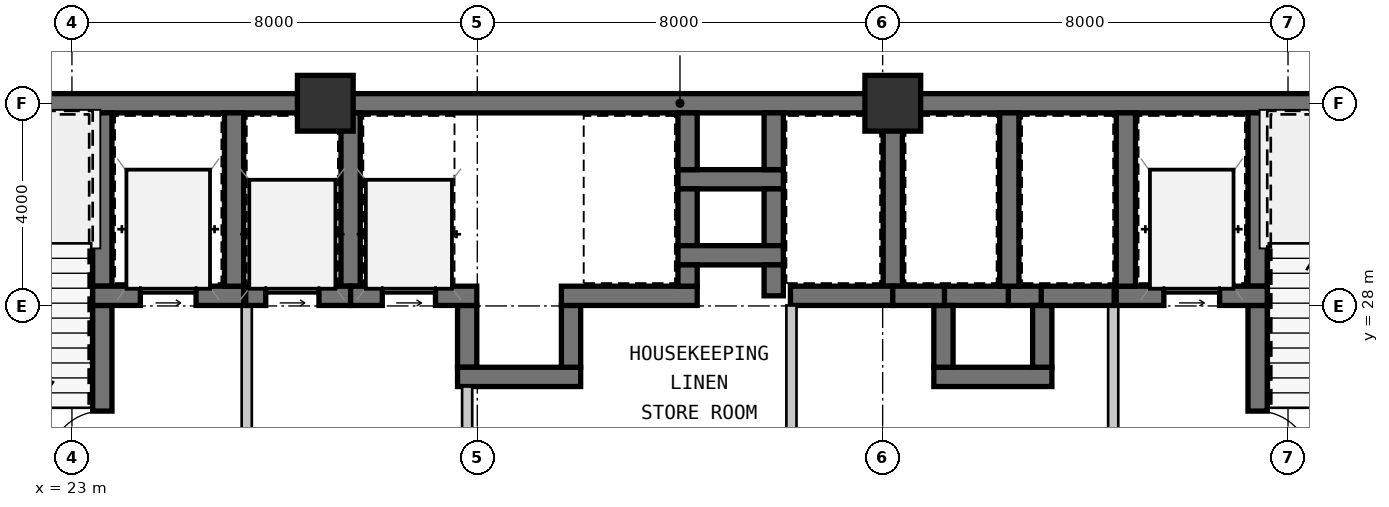
"""IFC4 building model, lengths in metres.
Left out: names, types, materials, properties, quantities, classifications, styles, units other than length and angle.
Written with IfcOpenShell. Run it as: python <this file> out.ifc"""

import sys

from ifc_helpers import new_model, si_unit, direction, frame, frame_2d, origin, origin_2d, place, context, subcontext, project, spatial, rectangle, extrude, source, transform, mapped, element, fill, save


model = new_model("IFC4")
c1 = context("Model", 3, precision=1e-05, world=origin(), true_north=direction((0.0, 1.0)))
c2 = subcontext(c1, "Body", "Model", "MODEL_VIEW")
j1 = project(units=[si_unit("LENGTHUNIT", "METRE"), si_unit("PLANEANGLEUNIT", "RADIAN")], contexts=[c1])
p1 = place(None, origin())
s1 = spatial("IfcSite", under=j1, at=p1, CompositionType="ELEMENT")
p2 = place(p1, origin())
s2 = spatial("IfcBuilding", under=s1, at=p2, CompositionType="ELEMENT")
p3 = place(p2, frame((0.0, 0.0, 16.8)))
s3 = spatial("IfcBuildingStorey", under=s2, at=p3, CompositionType="ELEMENT", Elevation=16.8)
m1 = source(origin(), c2, "Body", "SweptSolid", [
    extrude(rectangle(XDim=1.1, YDim=1.1, at=origin_2d()), origin(), (0.0, 0.0, 1.0), 3.15),
])
for number, where, z_axis, x_axis in (
    (1, (28.0, 32.0, 0.0), (0.0, 0.0, 1.0), (1.0, 0.0, 0.0)),
    (2, (39.2, 32.0, 0.0), (0.0, 0.0, 1.0), (1.0, 0.0, 0.0)),
):
    element("IfcColumn", number, at=place(p3, frame(where, z_axis=z_axis, x_axis=x_axis)), inside=s3, PredefinedType="COLUMN", context=c2, shape_type="MappedRepresentation", body=[
        mapped(m1, transform((0.0, 0.0, 0.0), scale=1.0)),
    ])
m2 = source(origin(), c2, "Body", "SweptSolid", [
    extrude(rectangle(XDim=9.19, YDim=0.38, at=frame_2d((4.595, 0.0))), origin(), (0.0, 0.0, 1.0), 2.93),
])
p4 = place(p3, frame((18.81, 32.0, 0.0), z_axis=(0.0, 0.0, 1.0), x_axis=(1.0, 0.0, 0.0)))
e3 = element("IfcWall", 3, at=p4, inside=s3, PredefinedType="SHEAR", context=c2, shape_type="MappedRepresentation", body=[
    mapped(m2, transform((0.0, 0.0, 0.0), scale=1.0)),
])
m3 = source(origin(), c2, "Body", "SweptSolid", [
    extrude(rectangle(XDim=11.2, YDim=0.38, at=frame_2d((5.6, 0.0))), origin(), (0.0, 0.0, 1.0), 2.93),
])
p5 = place(p3, frame((28.0, 32.0, 0.0), z_axis=(0.0, 0.0, 1.0), x_axis=(1.0, 0.0, 0.0)))
e4 = element("IfcWall", 4, at=p5, inside=s3, PredefinedType="SHEAR", context=c2, shape_type="MappedRepresentation", body=[
    mapped(m3, transform((0.0, 0.0, 0.0), scale=1.0)),
])
m4 = source(origin(), c2, "Body", "SweptSolid", [
    extrude(rectangle(XDim=11.99, YDim=0.38, at=frame_2d((5.995, 0.0))), origin(), (0.0, 0.0, 1.0), 2.93),
])
p6 = place(p3, frame((39.2, 32.0, 0.0), z_axis=(0.0, 0.0, 1.0), x_axis=(1.0, 0.0, 0.0)))
e5 = element("IfcWall", 5, at=p6, inside=s3, PredefinedType="SHEAR", context=c2, shape_type="MappedRepresentation", body=[
    mapped(m4, transform((0.0, 0.0, 0.0), scale=1.0)),
])
m5 = source(origin(), c2, "Body", "SweptSolid", [
    extrude(rectangle(XDim=3.42, YDim=0.38, at=frame_2d((1.71, 0.0))), origin(), (0.0, 0.0, 1.0), 2.93),
])
p7 = place(p3, frame((23.6, 28.39, 0.0), z_axis=(0.0, 0.0, 1.0), x_axis=(0.0, 1.0, 0.0)))
e6 = element("IfcWall", 6, at=p7, inside=s3, PredefinedType="SHEAR", context=c2, shape_type="MappedRepresentation", body=[
    mapped(m5, transform((0.0, 0.0, 0.0), scale=1.0)),
])
m6 = source(origin(), c2, "Body", "SweptSolid", [
    extrude(rectangle(XDim=3.82, YDim=0.38, at=frame_2d((1.91, 0.0))), origin(), (0.0, 0.0, 1.0), 2.93),
])
p8 = place(p3, frame((23.6, 24.19, 0.0), z_axis=(0.0, 0.0, 1.0), x_axis=(0.0, 1.0, 0.0)))
e7 = element("IfcWall", 7, at=p8, inside=s3, PredefinedType="SHEAR", context=c2, shape_type="MappedRepresentation", body=[
    mapped(m6, transform((0.0, 0.0, 0.0), scale=1.0)),
])
m7 = source(origin(), c2, "Body", "SweptSolid", [
    extrude(rectangle(XDim=1.05, YDim=2.1, at=frame_2d((0.525, 1.05))), frame((0.0, 0.2, 0.0), z_axis=(0.0, -1.0, 0.0), x_axis=(1.0, 0.0, 0.0)), (0.0, 0.0, 1.0), 0.4),
])
p9 = place(p8, frame((0.685, 0.0, 0.0)))
e8 = element("IfcOpeningElement", 8, at=p9, cuts=e7, PredefinedType="OPENING", context=c2, shape_type="MappedRepresentation", body=[
    mapped(m7, transform((0.0, 0.0, 0.0), scale=1.0)),
])
m8 = source(origin(), c2, "Body", "SweptSolid", [
    extrude(rectangle(XDim=2.98, YDim=0.38, at=frame_2d((1.49, 0.0))), origin(), (0.0, 0.0, 1.0), 2.93),
])
p10 = place(p3, frame((23.41, 28.2, 0.0), z_axis=(0.0, 0.0, 1.0), x_axis=(1.0, 0.0, 0.0)))
e9 = element("IfcWall", 9, at=p10, inside=s3, PredefinedType="SHEAR", context=c2, shape_type="MappedRepresentation", body=[
    mapped(m8, transform((0.0, 0.0, 0.0), scale=1.0)),
])
m9 = source(origin(), c2, "Body", "SweptSolid", [
    extrude(rectangle(XDim=1.1, YDim=2.15, at=frame_2d((0.55, 1.075))), frame((0.0, 0.2, 0.0), z_axis=(0.0, -1.0, 0.0), x_axis=(1.0, 0.0, 0.0)), (0.0, 0.0, 1.0), 0.4),
])
p11 = place(p10, frame((0.94, 0.0, 0.0)))
e10 = element("IfcOpeningElement", 10, at=p11, cuts=e9, PredefinedType="OPENING", context=c2, shape_type="MappedRepresentation", body=[
    mapped(m9, transform((0.0, 0.0, 0.0), scale=1.0)),
])
p12 = place(p3, frame((26.2, 28.39, 0.0), z_axis=(0.0, 0.0, 1.0), x_axis=(0.0, 1.0, 0.0)))
e11 = element("IfcWall", 11, at=p12, inside=s3, PredefinedType="SHEAR", context=c2, shape_type="MappedRepresentation", body=[
    mapped(m5, transform((0.0, 0.0, 0.0), scale=1.0)),
])
m10 = source(origin(), c2, "Body", "SweptSolid", [
    extrude(rectangle(XDim=3.91, YDim=0.2, at=frame_2d((1.955, 0.0))), origin(), (0.0, 0.0, 1.0), 2.93),
])
p13 = place(p3, frame((26.45, 24.1, 0.0), z_axis=(0.0, 0.0, 1.0), x_axis=(0.0, 1.0, 0.0)))
e12 = element("IfcWall", 12, at=p13, inside=s3, PredefinedType="SOLIDWALL", context=c2, shape_type="MappedRepresentation", body=[
    mapped(m10, transform((0.0, 0.0, 0.0), scale=1.0)),
])
p14 = place(p3, frame((46.4, 31.81, 0.0), z_axis=(0.0, 0.0, 1.0), x_axis=(0.0, -1.0, 0.0)))
e13 = element("IfcWall", 13, at=p14, inside=s3, PredefinedType="SHEAR", context=c2, shape_type="MappedRepresentation", body=[
    mapped(m5, transform((0.0, 0.0, 0.0), scale=1.0)),
])
p15 = place(p3, frame((46.4, 28.01, 0.0), z_axis=(0.0, 0.0, 1.0), x_axis=(0.0, -1.0, 0.0)))
e14 = element("IfcWall", 14, at=p15, inside=s3, PredefinedType="SHEAR", context=c2, shape_type="MappedRepresentation", body=[
    mapped(m6, transform((0.0, 0.0, 0.0), scale=1.0)),
])
p16 = place(p15, frame((2.085, 0.0, 0.0)))
e15 = element("IfcOpeningElement", 15, at=p16, cuts=e14, PredefinedType="OPENING", context=c2, shape_type="MappedRepresentation", body=[
    mapped(m7, transform((0.0, 0.0, 0.0), scale=1.0)),
])
p17 = place(p3, frame((43.61, 28.2, 0.0), z_axis=(0.0, 0.0, 1.0), x_axis=(1.0, 0.0, 0.0)))
e16 = element("IfcWall", 16, at=p17, inside=s3, PredefinedType="SHEAR", context=c2, shape_type="MappedRepresentation", body=[
    mapped(m8, transform((0.0, 0.0, 0.0), scale=1.0)),
])
p18 = place(p17, frame((0.94, 0.0, 0.0)))
e17 = element("IfcOpeningElement", 17, at=p18, cuts=e16, PredefinedType="OPENING", context=c2, shape_type="MappedRepresentation", body=[
    mapped(m9, transform((0.0, 0.0, 0.0), scale=1.0)),
])
p19 = place(p3, frame((43.8, 31.81, 0.0), z_axis=(0.0, 0.0, 1.0), x_axis=(0.0, -1.0, 0.0)))
e18 = element("IfcWall", 18, at=p19, inside=s3, PredefinedType="SHEAR", context=c2, shape_type="MappedRepresentation", body=[
    mapped(m5, transform((0.0, 0.0, 0.0), scale=1.0)),
])
p20 = place(p3, frame((43.55, 28.01, 0.0), z_axis=(0.0, 0.0, 1.0), x_axis=(0.0, -1.0, 0.0)))
e19 = element("IfcWall", 19, at=p20, inside=s3, PredefinedType="SOLIDWALL", context=c2, shape_type="MappedRepresentation", body=[
    mapped(m10, transform((0.0, 0.0, 0.0), scale=1.0)),
])
m11 = source(origin(), c2, "Body", "SweptSolid", [
    extrude(rectangle(XDim=2.08, YDim=0.38, at=frame_2d((1.04, 0.0))), origin(), (0.0, 0.0, 1.0), 2.93),
])
p21 = place(p3, frame((34.96, 30.5, 0.0), z_axis=(0.0, 0.0, 1.0), x_axis=(1.0, 0.0, 0.0)))
e20 = element("IfcWall", 20, at=p21, inside=s3, PredefinedType="SHEAR", context=c2, shape_type="MappedRepresentation", body=[
    mapped(m11, transform((0.0, 0.0, 0.0), scale=1.0)),
])
m12 = source(origin(), c2, "Body", "SweptSolid", [
    extrude(rectangle(XDim=1.12, YDim=0.38, at=frame_2d((0.56, 0.0))), origin(), (0.0, 0.0, 1.0), 2.93),
])
for number, where, z_axis, x_axis in (
    (21, (35.15, 31.81, 0.0), (0.0, 0.0, 1.0), (0.0, -1.0, 0.0)),
    (22, (36.85, 30.69, 0.0), (0.0, 0.0, 1.0), (0.0, 1.0, 0.0)),
    (23, (35.15, 30.31, 0.0), (0.0, 0.0, 1.0), (0.0, -1.0, 0.0)),
    (24, (36.85, 29.19, 0.0), (0.0, 0.0, 1.0), (0.0, 1.0, 0.0)),
):
    element("IfcWall", number, at=place(p3, frame(where, z_axis=z_axis, x_axis=x_axis)), inside=s3, PredefinedType="SHEAR", context=c2, shape_type="MappedRepresentation", body=[
        mapped(m12, transform((0.0, 0.0, 0.0), scale=1.0)),
    ])
p22 = place(p3, frame((34.96, 29.0, 0.0), z_axis=(0.0, 0.0, 1.0), x_axis=(1.0, 0.0, 0.0)))
e25 = element("IfcWall", 25, at=p22, inside=s3, PredefinedType="SHEAR", context=c2, shape_type="MappedRepresentation", body=[
    mapped(m11, transform((0.0, 0.0, 0.0), scale=1.0)),
])
m13 = source(origin(), c2, "Body", "SweptSolid", [
    extrude(rectangle(XDim=1.22, YDim=0.38, at=frame_2d((0.61, 0.0))), origin(), (0.0, 0.0, 1.0), 2.93),
])
p23 = place(p3, frame((30.8, 28.01, 0.0), z_axis=(0.0, 0.0, 1.0), x_axis=(0.0, -1.0, 0.0)))
e26 = element("IfcWall", 26, at=p23, inside=s3, PredefinedType="SHEAR", context=c2, shape_type="MappedRepresentation", body=[
    mapped(m13, transform((0.0, 0.0, 0.0), scale=1.0)),
])
m14 = source(origin(), c2, "Body", "SweptSolid", [
    extrude(rectangle(XDim=2.43, YDim=0.38, at=frame_2d((1.215, 0.0))), origin(), (0.0, 0.0, 1.0), 2.93),
])
p24 = place(p3, frame((30.61, 26.6, 0.0), z_axis=(0.0, 0.0, 1.0), x_axis=(1.0, 0.0, 0.0)))
e27 = element("IfcWall", 27, at=p24, inside=s3, PredefinedType="SHEAR", context=c2, shape_type="MappedRepresentation", body=[
    mapped(m14, transform((0.0, 0.0, 0.0), scale=1.0)),
])
p25 = place(p3, frame((32.85, 26.79, 0.0), z_axis=(0.0, 0.0, 1.0), x_axis=(0.0, 1.0, 0.0)))
e28 = element("IfcWall", 28, at=p25, inside=s3, PredefinedType="SHEAR", context=c2, shape_type="MappedRepresentation", body=[
    mapped(m13, transform((0.0, 0.0, 0.0), scale=1.0)),
])
m15 = source(origin(), c2, "Body", "SweptSolid", [
    extrude(rectangle(XDim=1.32, YDim=0.38, at=frame_2d((0.66, 0.0))), origin(), (0.0, 0.0, 1.0), 2.93),
])
p26 = place(p3, frame((41.52, 28.2, 0.0), z_axis=(0.0, 0.0, 1.0), x_axis=(-1.0, 0.0, 0.0)))
e29 = element("IfcWall", 29, at=p26, inside=s3, PredefinedType="SHEAR", context=c2, shape_type="MappedRepresentation", body=[
    mapped(m15, transform((0.0, 0.0, 0.0), scale=1.0)),
])
m16 = source(origin(), c2, "Body", "SweptSolid", [
    extrude(rectangle(XDim=0.67, YDim=0.38, at=frame_2d((0.335, 0.0))), origin(), (0.0, 0.0, 1.0), 2.93),
])
p27 = place(p3, frame((42.15, 28.2, 0.0), z_axis=(0.0, 0.0, 1.0), x_axis=(-1.0, 0.0, 0.0)))
e30 = element("IfcWall", 30, at=p27, inside=s3, PredefinedType="SHEAR", context=c2, shape_type="MappedRepresentation", body=[
    mapped(m16, transform((0.0, 0.0, 0.0), scale=1.0)),
])
m17 = source(origin(), c2, "Body", "SweptSolid", [
    extrude(rectangle(XDim=2.33, YDim=0.38, at=frame_2d((1.165, 0.0))), origin(), (0.0, 0.0, 1.0), 2.93),
])
p28 = place(p3, frame((40.01, 26.6, 0.0), z_axis=(0.0, 0.0, 1.0), x_axis=(1.0, 0.0, 0.0)))
e31 = element("IfcWall", 31, at=p28, inside=s3, PredefinedType="SHEAR", context=c2, shape_type="MappedRepresentation", body=[
    mapped(m17, transform((0.0, 0.0, 0.0), scale=1.0)),
])
for number, where, z_axis, x_axis in (
    (32, (40.2, 28.01, 0.0), (0.0, 0.0, 1.0), (0.0, -1.0, 0.0)),
    (33, (42.15, 26.79, 0.0), (0.0, 0.0, 1.0), (0.0, 1.0, 0.0)),
):
    element("IfcWall", number, at=place(p3, frame(where, z_axis=z_axis, x_axis=x_axis)), inside=s3, PredefinedType="SHEAR", context=c2, shape_type="MappedRepresentation", body=[
        mapped(m13, transform((0.0, 0.0, 0.0), scale=1.0)),
    ])
p29 = place(p3, frame((28.5, 28.39, 0.0), z_axis=(0.0, 0.0, 1.0), x_axis=(0.0, 1.0, 0.0)))
e34 = element("IfcWall", 34, at=p29, inside=s3, PredefinedType="SHEAR", context=c2, shape_type="MappedRepresentation", body=[
    mapped(m5, transform((0.0, 0.0, 0.0), scale=1.0)),
])
m18 = source(origin(), c2, "Body", "SweptSolid", [
    extrude(rectangle(XDim=2.07, YDim=0.38, at=frame_2d((1.035, 0.0))), origin(), (0.0, 0.0, 1.0), 2.93),
])
p30 = place(p3, frame((26.43, 28.2, 0.0), z_axis=(0.0, 0.0, 1.0), x_axis=(1.0, 0.0, 0.0)))
e35 = element("IfcWall", 35, at=p30, inside=s3, PredefinedType="SHEAR", context=c2, shape_type="MappedRepresentation", body=[
    mapped(m18, transform((0.0, 0.0, 0.0), scale=1.0)),
])
m19 = source(origin(), c2, "Body", "SweptSolid", [
    extrude(rectangle(XDim=1.05, YDim=2.15, at=frame_2d((0.525, 1.075))), frame((0.0, 0.2, 0.0), z_axis=(0.0, -1.0, 0.0), x_axis=(1.0, 0.0, 0.0)), (0.0, 0.0, 1.0), 0.4),
])
p31 = place(p30, frame((0.395, 0.0, 0.0)))
e36 = element("IfcOpeningElement", 36, at=p31, cuts=e35, PredefinedType="OPENING", context=c2, shape_type="MappedRepresentation", body=[
    mapped(m19, transform((0.0, 0.0, 0.0), scale=1.0)),
])
m20 = source(origin(), c2, "Body", "SweptSolid", [
    extrude(rectangle(XDim=2.49, YDim=0.38, at=frame_2d((1.245, 0.0))), origin(), (0.0, 0.0, 1.0), 2.93),
])
p32 = place(p3, frame((28.5, 28.2, 0.0), z_axis=(0.0, 0.0, 1.0), x_axis=(1.0, 0.0, 0.0)))
e37 = element("IfcWall", 37, at=p32, inside=s3, PredefinedType="SHEAR", context=c2, shape_type="MappedRepresentation", body=[
    mapped(m20, transform((0.0, 0.0, 0.0), scale=1.0)),
])
p33 = place(p32, frame((0.625, 0.0, 0.0)))
e38 = element("IfcOpeningElement", 38, at=p33, cuts=e37, PredefinedType="OPENING", context=c2, shape_type="MappedRepresentation", body=[
    mapped(m19, transform((0.0, 0.0, 0.0), scale=1.0)),
])
m21 = source(origin(), c2, "Body", "SweptSolid", [
    extrude(rectangle(XDim=2.31, YDim=0.2, at=frame_2d((1.155, 0.0))), origin(), (0.0, 0.0, 1.0), 2.93),
])
p34 = place(p3, frame((30.8, 26.41, 0.0), z_axis=(0.0, 0.0, 1.0), x_axis=(0.0, -1.0, 0.0)))
e39 = element("IfcWall", 39, at=p34, inside=s3, PredefinedType="SOLIDWALL", context=c2, shape_type="MappedRepresentation", body=[
    mapped(m21, transform((0.0, 0.0, 0.0), scale=1.0)),
])
m22 = source(origin(), c2, "Body", "SweptSolid", [
    extrude(rectangle(XDim=2.68, YDim=0.38, at=frame_2d((1.34, 0.0))), origin(), (0.0, 0.0, 1.0), 2.93),
])
p35 = place(p3, frame((32.66, 28.2, 0.0), z_axis=(0.0, 0.0, 1.0), x_axis=(1.0, 0.0, 0.0)))
e40 = element("IfcWall", 40, at=p35, inside=s3, PredefinedType="SHEAR", context=c2, shape_type="MappedRepresentation", body=[
    mapped(m22, transform((0.0, 0.0, 0.0), scale=1.0)),
])
m23 = source(origin(), c2, "Body", "SweptSolid", [
    extrude(rectangle(XDim=0.42, YDim=0.38, at=frame_2d((0.21, 0.0))), origin(), (0.0, 0.0, 1.0), 2.93),
])
p36 = place(p3, frame((35.15, 28.39, 0.0), z_axis=(0.0, 0.0, 1.0), x_axis=(0.0, 1.0, 0.0)))
e41 = element("IfcWall", 41, at=p36, inside=s3, PredefinedType="SHEAR", context=c2, shape_type="MappedRepresentation", body=[
    mapped(m23, transform((0.0, 0.0, 0.0), scale=1.0)),
])
p37 = place(p3, frame((39.2, 28.39, 0.0), z_axis=(0.0, 0.0, 1.0), x_axis=(0.0, 1.0, 0.0)))
e42 = element("IfcWall", 42, at=p37, inside=s3, PredefinedType="SHEAR", context=c2, shape_type="MappedRepresentation", body=[
    mapped(m5, transform((0.0, 0.0, 0.0), scale=1.0)),
])
m24 = source(origin(), c2, "Body", "SweptSolid", [
    extrude(rectangle(XDim=0.61, YDim=0.38, at=frame_2d((0.305, 0.0))), origin(), (0.0, 0.0, 1.0), 2.93),
])
p38 = place(p3, frame((36.85, 28.81, 0.0), z_axis=(0.0, 0.0, 1.0), x_axis=(0.0, -1.0, 0.0)))
e43 = element("IfcWall", 43, at=p38, inside=s3, PredefinedType="SHEAR", context=c2, shape_type="MappedRepresentation", body=[
    mapped(m24, transform((0.0, 0.0, 0.0), scale=1.0)),
])
m25 = source(origin(), c2, "Body", "SweptSolid", [
    extrude(rectangle(XDim=2.02, YDim=0.38, at=frame_2d((1.01, 0.0))), origin(), (0.0, 0.0, 1.0), 2.93),
])
p39 = place(p3, frame((37.18, 28.2, 0.0), z_axis=(0.0, 0.0, 1.0), x_axis=(1.0, 0.0, 0.0)))
e44 = element("IfcWall", 44, at=p39, inside=s3, PredefinedType="SHEAR", context=c2, shape_type="MappedRepresentation", body=[
    mapped(m25, transform((0.0, 0.0, 0.0), scale=1.0)),
])
p40 = place(p3, frame((41.5, 28.39, 0.0), z_axis=(0.0, 0.0, 1.0), x_axis=(0.0, 1.0, 0.0)))
e45 = element("IfcWall", 45, at=p40, inside=s3, PredefinedType="SHEAR", context=c2, shape_type="MappedRepresentation", body=[
    mapped(m5, transform((0.0, 0.0, 0.0), scale=1.0)),
])
m26 = source(origin(), c2, "Body", "SweptSolid", [
    extrude(rectangle(XDim=1.02, YDim=0.38, at=frame_2d((0.51, 0.0))), origin(), (0.0, 0.0, 1.0), 2.93),
])
p41 = place(p3, frame((39.2, 28.2, 0.0), z_axis=(0.0, 0.0, 1.0), x_axis=(1.0, 0.0, 0.0)))
e46 = element("IfcWall", 46, at=p41, inside=s3, PredefinedType="SHEAR", context=c2, shape_type="MappedRepresentation", body=[
    mapped(m26, transform((0.0, 0.0, 0.0), scale=1.0)),
])
m27 = source(origin(), c2, "Body", "SweptSolid", [
    extrude(rectangle(XDim=1.44, YDim=0.38, at=frame_2d((0.72, 0.0))), origin(), (0.0, 0.0, 1.0), 2.93),
])
p42 = place(p3, frame((42.13, 28.2, 0.0), z_axis=(0.0, 0.0, 1.0), x_axis=(1.0, 0.0, 0.0)))
e47 = element("IfcWall", 47, at=p42, inside=s3, PredefinedType="SHEAR", context=c2, shape_type="MappedRepresentation", body=[
    mapped(m27, transform((0.0, 0.0, 0.0), scale=1.0)),
])
p43 = place(p3, frame((37.2, 28.01, 0.0), z_axis=(0.0, 0.0, 1.0), x_axis=(0.0, -1.0, 0.0)))
e48 = element("IfcWall", 48, at=p43, inside=s3, PredefinedType="SOLIDWALL", context=c2, shape_type="MappedRepresentation", body=[
    mapped(m10, transform((0.0, 0.0, 0.0), scale=1.0)),
])
m28 = source(origin(), c2, "Body", "SweptSolid", [
    extrude(rectangle(XDim=1.05, YDim=2.1, at=frame_2d((0.525, 1.05))), frame((0.0, 0.025, 0.0), z_axis=(0.0, -1.0, 0.0), x_axis=(1.0, 0.0, 0.0)), (0.0, 0.0, 1.0), 0.05),
])
p44 = place(p9, origin())
e49 = element("IfcDoor", 49, at=p44, inside=s3, OperationType="SINGLE_SWING_LEFT", PredefinedType="DOOR", context=c2, shape_type="MappedRepresentation", body=[
    mapped(m28, transform((0.0, 0.0, 0.0), scale=1.0)),
])
fill(e8, e49)
m29 = source(origin(), c2, "Body", "SweptSolid", [
    extrude(rectangle(XDim=1.1, YDim=2.15, at=frame_2d((0.55, 1.075))), frame((0.0, 0.025, 0.0), z_axis=(0.0, -1.0, 0.0), x_axis=(1.0, 0.0, 0.0)), (0.0, 0.0, 1.0), 0.05),
])
p45 = place(p11, origin())
e50 = element("IfcDoor", 50, at=p45, inside=s3, OperationType="SLIDING_TO_LEFT", PredefinedType="DOOR", context=c2, shape_type="MappedRepresentation", body=[
    mapped(m29, transform((0.0, 0.0, 0.0), scale=1.0)),
])
fill(e10, e50)
p46 = place(p16, origin())
e51 = element("IfcDoor", 51, at=p46, inside=s3, OperationType="SINGLE_SWING_RIGHT", PredefinedType="DOOR", context=c2, shape_type="MappedRepresentation", body=[
    mapped(m28, transform((0.0, 0.0, 0.0), scale=1.0)),
])
fill(e15, e51)
p47 = place(p18, origin())
e52 = element("IfcDoor", 52, at=p47, inside=s3, OperationType="SLIDING_TO_LEFT", PredefinedType="DOOR", context=c2, shape_type="MappedRepresentation", body=[
    mapped(m29, transform((0.0, 0.0, 0.0), scale=1.0)),
])
fill(e17, e52)
m30 = source(origin(), c2, "Body", "SweptSolid", [
    extrude(rectangle(XDim=1.05, YDim=2.15, at=frame_2d((0.525, 1.075))), frame((0.0, 0.025, 0.0), z_axis=(0.0, -1.0, 0.0), x_axis=(1.0, 0.0, 0.0)), (0.0, 0.0, 1.0), 0.05),
])
p48 = place(p31, origin())
e53 = element("IfcDoor", 53, at=p48, inside=s3, OperationType="SLIDING_TO_LEFT", PredefinedType="DOOR", context=c2, shape_type="MappedRepresentation", body=[
    mapped(m30, transform((0.0, 0.0, 0.0), scale=1.0)),
])
fill(e36, e53)
p49 = place(p33, origin())
e54 = element("IfcDoor", 54, at=p49, inside=s3, OperationType="SLIDING_TO_LEFT", PredefinedType="DOOR", context=c2, shape_type="MappedRepresentation", body=[
    mapped(m30, transform((0.0, 0.0, 0.0), scale=1.0)),
])
fill(e38, e54)
save(model, sys.argv[1])
